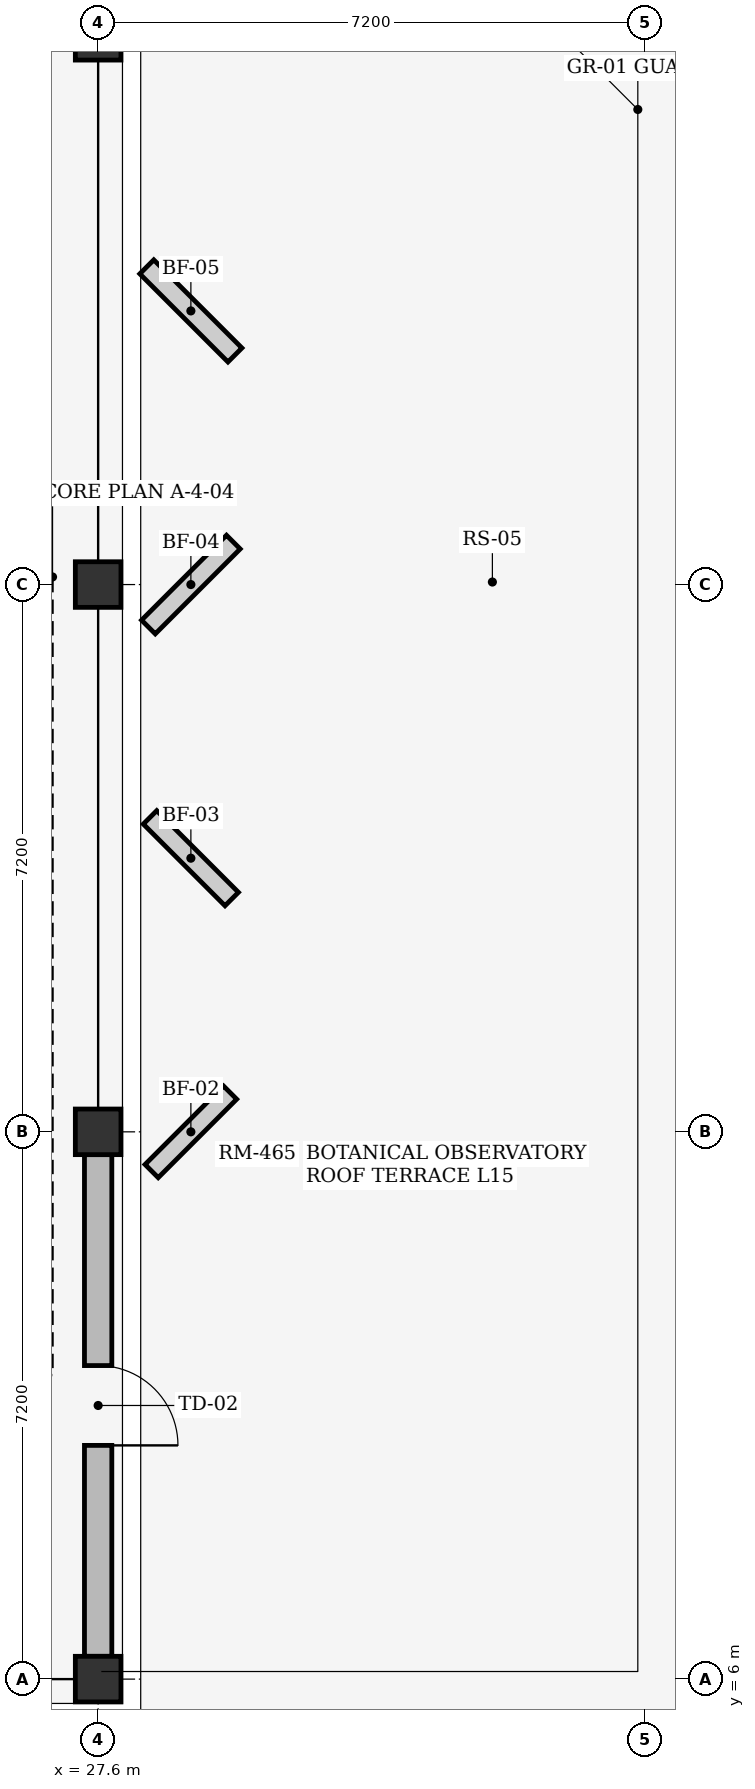
"""IFC4 building model, lengths in metres.
Left out: names, types, materials, properties, quantities, classifications, styles, units other than length and angle.
Written with IfcOpenShell. Run it as: python <this file> out.ifc"""

import sys

from ifc_helpers import new_model, si_unit, direction, frame, frame_2d, origin, origin_2d, place, context, subcontext, project, spatial, rectangle, extrude, element, fill, save


model = new_model("IFC4")
c1 = context("Model", 3, precision=1e-05, world=origin(), true_north=direction((0.0, 1.0)))
c2 = subcontext(c1, "Body", "Model", "MODEL_VIEW")
j1 = project(units=[si_unit("LENGTHUNIT", "METRE"), si_unit("PLANEANGLEUNIT", "RADIAN")], contexts=[c1])
p1 = place(None, origin())
s1 = spatial("IfcSite", under=j1, at=p1, CompositionType="ELEMENT")
p2 = place(p1, origin())
s2 = spatial("IfcBuilding", under=s1, at=p2, CompositionType="ELEMENT")
p3 = place(p2, frame((0.0, 0.0, 59.4)))
s3 = spatial("IfcBuildingStorey", under=s2, at=p3, CompositionType="ELEMENT", Elevation=59.4)
for number, where, z_axis, x_axis in (
    (1, (27.6, 6.0, 0.0), (0.0, 0.0, 1.0), (1.0, 0.0, 0.0)),
    (2, (27.6, 13.2, 0.0), (0.0, 0.0, 1.0), (1.0, 0.0, 0.0)),
    (3, (27.6, 20.4, 0.0), (0.0, 0.0, 1.0), (1.0, 0.0, 0.0)),
    (4, (27.6, 27.6, 0.0), (0.0, 0.0, 1.0), (1.0, 0.0, 0.0)),
):
    element("IfcColumn", number, at=place(p3, frame(where, z_axis=z_axis, x_axis=x_axis)), inside=s3, PredefinedType="COLUMN", context=c2, shape_type="SweptSolid", body=[
        extrude(rectangle(XDim=0.6, YDim=0.6, at=origin_2d()), origin(), (0.0, 0.0, 1.0), 3.53),
    ])
p4 = place(p3, frame((27.6, 6.3, 0.0), z_axis=(0.0, 0.0, 1.0), x_axis=(0.0, 1.0, 0.0)))
e5 = element("IfcWall", 5, at=p4, inside=s3, PredefinedType="STANDARD", context=c2, shape_type="SweptSolid", body=[
    extrude(rectangle(XDim=6.6, YDim=0.36, at=frame_2d((3.3, 0.0))), origin(), (0.0, 0.0, 1.0), 3.11),
])
p5 = place(p4, frame((2.775, 0.0, 0.0)))
e6 = element("IfcOpeningElement", 6, at=p5, cuts=e5, PredefinedType="OPENING", context=c2, shape_type="SweptSolid", body=[
    extrude(rectangle(XDim=1.05, YDim=2.15, at=frame_2d((0.525, 1.075))), frame((0.0, 0.19, 0.0), z_axis=(0.0, -1.0, 0.0), x_axis=(1.0, 0.0, 0.0)), (0.0, 0.0, 1.0), 0.38),
])
p6 = place(p5, frame((1.05, 0.0, 0.0), z_axis=(0.0, 0.0, 1.0), x_axis=(-1.0, 0.0, 0.0)))
e7 = element("IfcDoor", 7, at=p6, inside=s3, OperationType="SINGLE_SWING_LEFT", PredefinedType="DOOR", context=c2, shape_type="SweptSolid", body=[
    extrude(rectangle(XDim=1.05, YDim=2.15, at=frame_2d((0.525, 1.075))), frame((0.0, 0.025, 0.0), z_axis=(0.0, -1.0, 0.0), x_axis=(1.0, 0.0, 0.0)), (0.0, 0.0, 1.0), 0.05),
])
fill(e6, e7)
save(model, sys.argv[1])
